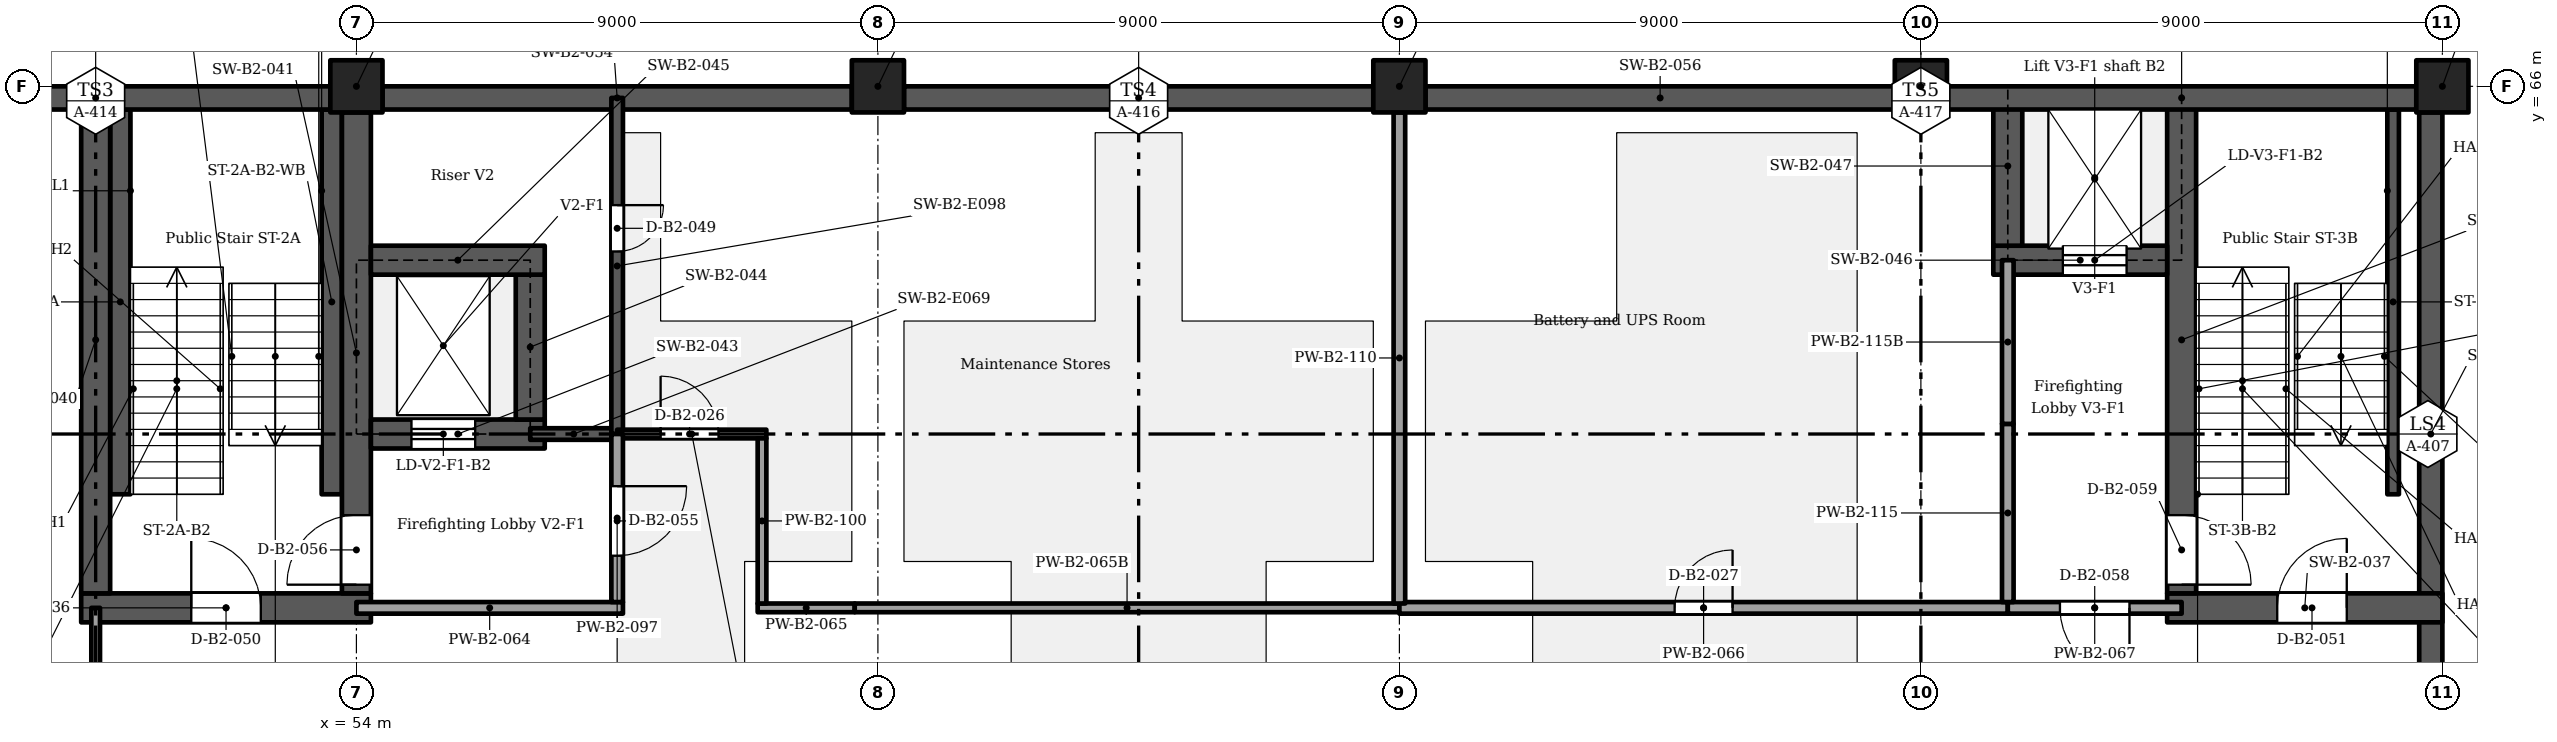
"""IFC4 building model, lengths in metres.
Left out: names, types, materials, properties, quantities, classifications, styles, units other than length and angle.
Written with IfcOpenShell. Run it as: python <this file> out.ifc"""

import sys

from ifc_helpers import new_model, si_unit, direction, frame, frame_2d, origin, origin_2d, place, context, subcontext, project, spatial, rectangle, extrude, element, fill, save


model = new_model("IFC4")
c1 = context("Model", 3, precision=1e-05, world=origin(), true_north=direction((0.0, 1.0)))
c2 = subcontext(c1, "Body", "Model", "MODEL_VIEW")
j1 = project(units=[si_unit("LENGTHUNIT", "METRE"), si_unit("PLANEANGLEUNIT", "RADIAN")], contexts=[c1])
p1 = place(None, origin())
s1 = spatial("IfcSite", under=j1, at=p1, CompositionType="ELEMENT")
p2 = place(p1, origin())
s2 = spatial("IfcBuilding", under=s1, at=p2, CompositionType="ELEMENT")
p3 = place(p2, frame((0.0, 0.0, -8.4)))
s3 = spatial("IfcBuildingStorey", under=s2, at=p3, CompositionType="ELEMENT", Elevation=-8.4)
for number, where, z_axis, x_axis in (
    (1, (54.0, 66.0, 0.0), (0.0, 0.0, 1.0), (1.0, 0.0, 0.0)),
    (2, (63.0, 66.0, 0.0), (0.0, 0.0, 1.0), (1.0, 0.0, 0.0)),
    (3, (72.0, 66.0, 0.0), (0.0, 0.0, 1.0), (1.0, 0.0, 0.0)),
    (4, (81.0, 66.0, 0.0), (0.0, 0.0, 1.0), (1.0, 0.0, 0.0)),
    (5, (90.0, 66.0, 0.0), (0.0, 0.0, 1.0), (1.0, 0.0, 0.0)),
):
    element("IfcColumn", number, at=place(p3, frame(where, z_axis=z_axis, x_axis=x_axis)), inside=s3, PredefinedType="COLUMN", context=c2, shape_type="SweptSolid", body=[
        extrude(rectangle(XDim=0.9, YDim=0.9, at=origin_2d()), origin(), (0.0, 0.0, 1.0), 4.2),
    ])
p4 = place(p3, frame((89.8, 54.45, 0.0), z_axis=(0.0, 0.0, 1.0), x_axis=(0.0, 1.0, 0.0)))
e6 = element("IfcWall", 6, at=p4, inside=s3, PredefinedType="SOLIDWALL", context=c2, shape_type="SweptSolid", body=[
    extrude(rectangle(XDim=11.1, YDim=0.4, at=frame_2d((5.55, 0.0))), origin(), (0.0, 0.0, 1.0), 3.8),
])
p5 = place(p3, frame((49.25, 57.0, 0.0), z_axis=(0.0, 0.0, 1.0), x_axis=(1.0, 0.0, 0.0)))
e7 = element("IfcWall", 7, at=p5, inside=s3, PredefinedType="SHEAR", context=c2, shape_type="SweptSolid", body=[
    extrude(rectangle(XDim=5.0, YDim=0.5, at=frame_2d((2.5, 0.0))), origin(), (0.0, 0.0, 1.0), 3.8),
])
p6 = place(p5, frame((1.9, 0.0, 0.0)))
e8 = element("IfcOpeningElement", 8, at=p6, cuts=e7, PredefinedType="OPENING", context=c2, shape_type="SweptSolid", body=[
    extrude(rectangle(XDim=1.2, YDim=2.1, at=frame_2d((0.6, 1.05))), frame((0.0, 0.26, 0.0), z_axis=(0.0, -1.0, 0.0), x_axis=(1.0, 0.0, 0.0)), (0.0, 0.0, 1.0), 0.52),
])
p7 = place(p3, frame((85.25, 57.0, 0.0), z_axis=(0.0, 0.0, 1.0), x_axis=(1.0, 0.0, 0.0)))
e9 = element("IfcWall", 9, at=p7, inside=s3, PredefinedType="SHEAR", context=c2, shape_type="SweptSolid", body=[
    extrude(rectangle(XDim=4.75, YDim=0.5, at=frame_2d((2.375, 0.0))), origin(), (0.0, 0.0, 1.0), 3.8),
])
p8 = place(p7, frame((1.9, 0.0, 0.0)))
e10 = element("IfcOpeningElement", 10, at=p8, cuts=e9, PredefinedType="OPENING", context=c2, shape_type="SweptSolid", body=[
    extrude(rectangle(XDim=1.2, YDim=2.1, at=frame_2d((0.6, 1.05))), frame((0.0, 0.26, 0.0), z_axis=(0.0, -1.0, 0.0), x_axis=(1.0, 0.0, 0.0)), (0.0, 0.0, 1.0), 0.52),
])
p9 = place(p3, frame((49.5, 57.25, 0.0), z_axis=(0.0, 0.0, 1.0), x_axis=(0.0, 1.0, 0.0)))
e11 = element("IfcWall", 11, at=p9, inside=s3, PredefinedType="SHEAR", context=c2, shape_type="SweptSolid", body=[
    extrude(rectangle(XDim=8.75, YDim=0.5, at=frame_2d((4.375, 0.0))), origin(), (0.0, 0.0, 1.0), 3.8),
])
p10 = place(p3, frame((54.0, 57.25, 0.0), z_axis=(0.0, 0.0, 1.0), x_axis=(0.0, 1.0, 0.0)))
e12 = element("IfcWall", 12, at=p10, inside=s3, PredefinedType="SHEAR", context=c2, shape_type="SweptSolid", body=[
    extrude(rectangle(XDim=8.3, YDim=0.5, at=frame_2d((4.15, 0.0))), origin(), (0.0, 0.0, 1.0), 3.8),
])
p11 = place(p10, frame((0.15, 0.0, 0.0)))
e13 = element("IfcOpeningElement", 13, at=p11, cuts=e12, PredefinedType="OPENING", context=c2, shape_type="SweptSolid", body=[
    extrude(rectangle(XDim=1.2, YDim=2.1, at=frame_2d((0.6, 1.05))), frame((0.0, 0.26, 0.0), z_axis=(0.0, -1.0, 0.0), x_axis=(1.0, 0.0, 0.0)), (0.0, 0.0, 1.0), 0.52),
])
p12 = place(p3, frame((85.5, 57.25, 0.0), z_axis=(0.0, 0.0, 1.0), x_axis=(0.0, 1.0, 0.0)))
e14 = element("IfcWall", 14, at=p12, inside=s3, PredefinedType="SHEAR", context=c2, shape_type="SweptSolid", body=[
    extrude(rectangle(XDim=8.75, YDim=0.5, at=frame_2d((4.375, 0.0))), origin(), (0.0, 0.0, 1.0), 3.8),
])
p13 = place(p12, frame((1.35, 0.0, 0.0), z_axis=(0.0, 0.0, 1.0), x_axis=(-1.0, 0.0, 0.0)))
e15 = element("IfcOpeningElement", 15, at=p13, cuts=e14, PredefinedType="OPENING", context=c2, shape_type="SweptSolid", body=[
    extrude(rectangle(XDim=1.2, YDim=2.1, at=frame_2d((0.6, 1.05))), frame((0.0, 0.26, 0.0), z_axis=(0.0, -1.0, 0.0), x_axis=(1.0, 0.0, 0.0)), (0.0, 0.0, 1.0), 0.52),
])
p14 = place(p3, frame((54.25, 60.0, 0.0), z_axis=(0.0, 0.0, 1.0), x_axis=(1.0, 0.0, 0.0)))
e16 = element("IfcWall", 16, at=p14, inside=s3, PredefinedType="SHEAR", context=c2, shape_type="SweptSolid", body=[
    extrude(rectangle(XDim=3.0, YDim=0.5, at=frame_2d((1.5, 0.0))), origin(), (0.0, 0.0, 1.0), 3.8),
])
p15 = place(p14, frame((0.7, 0.0, 0.0)))
e17 = element("IfcOpeningElement", 17, at=p15, cuts=e16, PredefinedType="OPENING", context=c2, shape_type="SweptSolid", body=[
    extrude(rectangle(XDim=1.1, YDim=2.1, at=frame_2d((0.55, 1.05))), frame((0.0, 0.26, 0.0), z_axis=(0.0, -1.0, 0.0), x_axis=(1.0, 0.0, 0.0)), (0.0, 0.0, 1.0), 0.52),
])
p16 = place(p3, frame((57.0, 60.25, 0.0), z_axis=(0.0, 0.0, 1.0), x_axis=(0.0, 1.0, 0.0)))
e18 = element("IfcWall", 18, at=p16, inside=s3, PredefinedType="SHEAR", context=c2, shape_type="SweptSolid", body=[
    extrude(rectangle(XDim=2.5, YDim=0.5, at=frame_2d((1.25, 0.0))), origin(), (0.0, 0.0, 1.0), 3.8),
])
p17 = place(p3, frame((54.25, 63.0, 0.0), z_axis=(0.0, 0.0, 1.0), x_axis=(1.0, 0.0, 0.0)))
e19 = element("IfcWall", 19, at=p17, inside=s3, PredefinedType="SHEAR", context=c2, shape_type="SweptSolid", body=[
    extrude(rectangle(XDim=3.0, YDim=0.5, at=frame_2d((1.5, 0.0))), origin(), (0.0, 0.0, 1.0), 3.8),
])
p18 = place(p3, frame((82.25, 63.0, 0.0), z_axis=(0.0, 0.0, 1.0), x_axis=(1.0, 0.0, 0.0)))
e20 = element("IfcWall", 20, at=p18, inside=s3, PredefinedType="SHEAR", context=c2, shape_type="SweptSolid", body=[
    extrude(rectangle(XDim=3.0, YDim=0.5, at=frame_2d((1.5, 0.0))), origin(), (0.0, 0.0, 1.0), 3.8),
])
p19 = place(p18, frame((1.2, 0.0, 0.0)))
e21 = element("IfcOpeningElement", 21, at=p19, cuts=e20, PredefinedType="OPENING", context=c2, shape_type="SweptSolid", body=[
    extrude(rectangle(XDim=1.1, YDim=2.1, at=frame_2d((0.55, 1.05))), frame((0.0, 0.26, 0.0), z_axis=(0.0, -1.0, 0.0), x_axis=(1.0, 0.0, 0.0)), (0.0, 0.0, 1.0), 0.52),
])
p20 = place(p3, frame((82.5, 63.25, 0.0), z_axis=(0.0, 0.0, 1.0), x_axis=(0.0, 1.0, 0.0)))
e22 = element("IfcWall", 22, at=p20, inside=s3, PredefinedType="SHEAR", context=c2, shape_type="SweptSolid", body=[
    extrude(rectangle(XDim=2.75, YDim=0.5, at=frame_2d((1.375, 0.0))), origin(), (0.0, 0.0, 1.0), 3.8),
])
for number, where, z_axis, x_axis in (
    (23, (45.45, 65.8, 0.0), (0.0, 0.0, 1.0), (1.0, 0.0, 0.0)),
    (24, (54.45, 65.8, 0.0), (0.0, 0.0, 1.0), (1.0, 0.0, 0.0)),
    (25, (63.45, 65.8, 0.0), (0.0, 0.0, 1.0), (1.0, 0.0, 0.0)),
    (26, (72.45, 65.8, 0.0), (0.0, 0.0, 1.0), (1.0, 0.0, 0.0)),
    (27, (81.45, 65.8, 0.0), (0.0, 0.0, 1.0), (1.0, 0.0, 0.0)),
):
    element("IfcWall", number, at=place(p3, frame(where, z_axis=z_axis, x_axis=x_axis)), inside=s3, PredefinedType="SOLIDWALL", context=c2, shape_type="SweptSolid", body=[
        extrude(rectangle(XDim=8.1, YDim=0.4, at=frame_2d((4.05, 0.0))), origin(), (0.0, 0.0, 1.0), 3.8),
    ])
p21 = place(p3, frame((54.0, 57.0, 0.0), z_axis=(0.0, 0.0, 1.0), x_axis=(1.0, 0.0, 0.0)))
e28 = element("IfcWall", 28, at=p21, inside=s3, PredefinedType="PARTITIONING", context=c2, shape_type="SweptSolid", body=[
    extrude(rectangle(XDim=4.6, YDim=0.2, at=frame_2d((2.3, 0.0))), origin(), (0.0, 0.0, 1.0), 3.1),
])
p22 = place(p3, frame((60.925, 57.0, 0.0), z_axis=(0.0, 0.0, 1.0), x_axis=(1.0, 0.0, 0.0)))
e29 = element("IfcWall", 29, at=p22, inside=s3, PredefinedType="PARTITIONING", context=c2, shape_type="SweptSolid", body=[
    extrude(rectangle(XDim=1.675, YDim=0.15, at=frame_2d((0.837, 0.0))), origin(), (0.0, 0.0, 1.0), 3.1),
])
p23 = place(p3, frame((72.0, 57.0, 0.0), z_axis=(0.0, 0.0, 1.0), x_axis=(1.0, 0.0, 0.0)))
e30 = element("IfcWall", 30, at=p23, inside=s3, PredefinedType="PARTITIONING", context=c2, shape_type="SweptSolid", body=[
    extrude(rectangle(XDim=10.5, YDim=0.2, at=frame_2d((5.25, 0.0))), origin(), (0.0, 0.0, 1.0), 3.8),
])
p24 = place(p23, frame((4.75, 0.0, 0.0)))
e31 = element("IfcOpeningElement", 31, at=p24, cuts=e30, PredefinedType="OPENING", context=c2, shape_type="SweptSolid", body=[
    extrude(rectangle(XDim=1.0, YDim=2.1, at=frame_2d((0.5, 1.05))), frame((0.0, 0.11, 0.0), z_axis=(0.0, -1.0, 0.0), x_axis=(1.0, 0.0, 0.0)), (0.0, 0.0, 1.0), 0.22),
])
p25 = place(p3, frame((82.5, 57.0, 0.0), z_axis=(0.0, 0.0, 1.0), x_axis=(1.0, 0.0, 0.0)))
e32 = element("IfcWall", 32, at=p25, inside=s3, PredefinedType="PARTITIONING", context=c2, shape_type="SweptSolid", body=[
    extrude(rectangle(XDim=3.0, YDim=0.2, at=frame_2d((1.5, 0.0))), origin(), (0.0, 0.0, 1.0), 3.8),
])
p26 = place(p25, frame((2.1, 0.0, 0.0), z_axis=(0.0, 0.0, 1.0), x_axis=(-1.0, 0.0, 0.0)))
e33 = element("IfcOpeningElement", 33, at=p26, cuts=e32, PredefinedType="OPENING", context=c2, shape_type="SweptSolid", body=[
    extrude(rectangle(XDim=1.2, YDim=2.1, at=frame_2d((0.6, 1.05))), frame((0.0, 0.11, 0.0), z_axis=(0.0, -1.0, 0.0), x_axis=(1.0, 0.0, 0.0)), (0.0, 0.0, 1.0), 0.22),
])
p27 = place(p3, frame((57.0, 60.0, 0.0), z_axis=(0.0, 0.0, 1.0), x_axis=(1.0, 0.0, 0.0)))
e34 = element("IfcWall", 34, at=p27, inside=s3, PredefinedType="SHEAR", context=c2, shape_type="SweptSolid", body=[
    extrude(rectangle(XDim=1.5, YDim=0.2, at=frame_2d((0.75, 0.0))), origin(), (0.0, 0.0, 1.0), 3.8),
])
p28 = place(p3, frame((58.5, 60.0, 0.0), z_axis=(0.0, 0.0, 1.0), x_axis=(1.0, 0.0, 0.0)))
e35 = element("IfcWall", 35, at=p28, inside=s3, PredefinedType="PARTITIONING", context=c2, shape_type="SweptSolid", body=[
    extrude(rectangle(XDim=2.575, YDim=0.15, at=frame_2d((1.288, 0.0))), origin(), (0.0, 0.0, 1.0), 3.8),
])
p29 = place(p28, frame((0.75, 0.0, 0.0)))
e36 = element("IfcOpeningElement", 36, at=p29, cuts=e35, PredefinedType="OPENING", context=c2, shape_type="SweptSolid", body=[
    extrude(rectangle(XDim=1.0, YDim=2.1, at=frame_2d((0.5, 1.05))), frame((0.0, 0.085, 0.0), z_axis=(0.0, -1.0, 0.0), x_axis=(1.0, 0.0, 0.0)), (0.0, 0.0, 1.0), 0.17),
])
p30 = place(p3, frame((49.5, 54.075, 0.0), z_axis=(0.0, 0.0, 1.0), x_axis=(0.0, 1.0, 0.0)))
e37 = element("IfcWall", 37, at=p30, inside=s3, PredefinedType="PARTITIONING", context=c2, shape_type="SweptSolid", body=[
    extrude(rectangle(XDim=2.925, YDim=0.15, at=frame_2d((1.462, 0.0))), origin(), (0.0, 0.0, 1.0), 3.3),
])
p31 = place(p3, frame((58.5, 57.1, 0.0), z_axis=(0.0, 0.0, 1.0), x_axis=(0.0, 1.0, 0.0)))
e38 = element("IfcWall", 38, at=p31, inside=s3, PredefinedType="PARTITIONING", context=c2, shape_type="SweptSolid", body=[
    extrude(rectangle(XDim=2.9, YDim=0.2, at=frame_2d((1.45, 0.0))), origin(), (0.0, 0.0, 1.0), 3.8),
])
p32 = place(p31, frame((2.0, 0.0, 0.0), z_axis=(0.0, 0.0, 1.0), x_axis=(-1.0, 0.0, 0.0)))
e39 = element("IfcOpeningElement", 39, at=p32, cuts=e38, PredefinedType="OPENING", context=c2, shape_type="SweptSolid", body=[
    extrude(rectangle(XDim=1.2, YDim=2.1, at=frame_2d((0.6, 1.05))), frame((0.0, 0.11, 0.0), z_axis=(0.0, -1.0, 0.0), x_axis=(1.0, 0.0, 0.0)), (0.0, 0.0, 1.0), 0.22),
])
p33 = place(p3, frame((58.5, 60.0, 0.0), z_axis=(0.0, 0.0, 1.0), x_axis=(0.0, 1.0, 0.0)))
e40 = element("IfcWall", 40, at=p33, inside=s3, PredefinedType="SHEAR", context=c2, shape_type="SweptSolid", body=[
    extrude(rectangle(XDim=5.8, YDim=0.2, at=frame_2d((2.9, 0.0))), origin(), (0.0, 0.0, 1.0), 3.8),
])
p34 = place(p33, frame((3.95, 0.0, 0.0), z_axis=(0.0, 0.0, 1.0), x_axis=(-1.0, 0.0, 0.0)))
e41 = element("IfcOpeningElement", 41, at=p34, cuts=e40, PredefinedType="OPENING", context=c2, shape_type="SweptSolid", body=[
    extrude(rectangle(XDim=0.8, YDim=2.0, at=frame_2d((0.4, 1.0))), frame((0.0, 0.11, 0.0), z_axis=(0.0, -1.0, 0.0), x_axis=(1.0, 0.0, 0.0)), (0.0, 0.0, 1.0), 0.22),
])
p35 = place(p3, frame((61.0, 57.075, 0.0), z_axis=(0.0, 0.0, 1.0), x_axis=(0.0, 1.0, 0.0)))
e42 = element("IfcWall", 42, at=p35, inside=s3, PredefinedType="PARTITIONING", context=c2, shape_type="SweptSolid", body=[
    extrude(rectangle(XDim=2.85, YDim=0.15, at=frame_2d((1.425, 0.0))), origin(), (0.0, 0.0, 1.0), 3.8),
])
p36 = place(p3, frame((72.0, 57.075, 0.0), z_axis=(0.0, 0.0, 1.0), x_axis=(0.0, 1.0, 0.0)))
e43 = element("IfcWall", 43, at=p36, inside=s3, PredefinedType="PARTITIONING", context=c2, shape_type="SweptSolid", body=[
    extrude(rectangle(XDim=8.475, YDim=0.2, at=frame_2d((4.238, 0.0))), origin(), (0.0, 0.0, 1.0), 3.05),
])
p37 = place(p3, frame((82.5, 57.1, 0.0), z_axis=(0.0, 0.0, 1.0), x_axis=(0.0, 1.0, 0.0)))
e44 = element("IfcWall", 44, at=p37, inside=s3, PredefinedType="PARTITIONING", context=c2, shape_type="SweptSolid", body=[
    extrude(rectangle(XDim=3.075, YDim=0.2, at=frame_2d((1.538, 0.0))), origin(), (0.0, 0.0, 1.0), 3.8),
])
for number, where, z_axis, x_axis in (
    (45, (49.925, 58.96, 0.0), (0.0, 0.0, 1.0), (0.0, 1.0, 0.0)),
    (46, (53.575, 58.96, 0.0), (0.0, 0.0, 1.0), (0.0, 1.0, 0.0)),
):
    element("IfcWall", number, at=place(p3, frame(where, z_axis=z_axis, x_axis=x_axis)), inside=s3, PredefinedType="SHEAR", context=c2, shape_type="SweptSolid", body=[
        extrude(rectangle(XDim=6.64, YDim=0.35, at=frame_2d((3.32, 0.0))), origin(), (0.0, 0.0, 1.0), 3.8),
    ])
p38 = place(p3, frame((89.15, 58.96, 0.0), z_axis=(0.0, 0.0, 1.0), x_axis=(0.0, 1.0, 0.0)))
e47 = element("IfcWall", 47, at=p38, inside=s3, PredefinedType="SHEAR", context=c2, shape_type="SweptSolid", body=[
    extrude(rectangle(XDim=6.64, YDim=0.2, at=frame_2d((3.32, 0.0))), origin(), (0.0, 0.0, 1.0), 3.8),
])
p39 = place(p3, frame((62.6, 57.0, 0.0), z_axis=(0.0, 0.0, 1.0), x_axis=(1.0, 0.0, 0.0)))
e48 = element("IfcWall", 48, at=p39, inside=s3, PredefinedType="PARTITIONING", context=c2, shape_type="SweptSolid", body=[
    extrude(rectangle(XDim=9.4, YDim=0.15, at=frame_2d((4.7, 0.0))), origin(), (0.0, 0.0, 1.0), 3.8),
])
p40 = place(p3, frame((82.5, 60.175, 0.0), z_axis=(0.0, 0.0, 1.0), x_axis=(0.0, 1.0, 0.0)))
e49 = element("IfcWall", 49, at=p40, inside=s3, PredefinedType="PARTITIONING", context=c2, shape_type="SweptSolid", body=[
    extrude(rectangle(XDim=2.825, YDim=0.2, at=frame_2d((1.413, 0.0))), origin(), (0.0, 0.0, 1.0), 3.3),
])
p41 = place(p29, origin())
e50 = element("IfcDoor", 50, at=p41, inside=s3, OperationType="SINGLE_SWING_LEFT", PredefinedType="DOOR", context=c2, shape_type="SweptSolid", body=[
    extrude(rectangle(XDim=1.0, YDim=2.1, at=frame_2d((0.5, 1.05))), frame((0.0, 0.025, 0.0), z_axis=(0.0, -1.0, 0.0), x_axis=(1.0, 0.0, 0.0)), (0.0, 0.0, 1.0), 0.05),
])
fill(e36, e50)
p42 = place(p24, origin())
e51 = element("IfcDoor", 51, at=p42, inside=s3, OperationType="SINGLE_SWING_RIGHT", PredefinedType="DOOR", context=c2, shape_type="SweptSolid", body=[
    extrude(rectangle(XDim=1.0, YDim=2.1, at=frame_2d((0.5, 1.05))), frame((0.0, 0.025, 0.0), z_axis=(0.0, -1.0, 0.0), x_axis=(1.0, 0.0, 0.0)), (0.0, 0.0, 1.0), 0.05),
])
fill(e31, e51)
p43 = place(p34, origin())
e52 = element("IfcDoor", 52, at=p43, inside=s3, OperationType="SINGLE_SWING_LEFT", PredefinedType="DOOR", context=c2, shape_type="SweptSolid", body=[
    extrude(rectangle(XDim=0.8, YDim=2.0, at=frame_2d((0.4, 1.0))), frame((0.0, 0.025, 0.0), z_axis=(0.0, -1.0, 0.0), x_axis=(1.0, 0.0, 0.0)), (0.0, 0.0, 1.0), 0.05),
])
fill(e41, e52)
p44 = place(p6, origin())
e53 = element("IfcDoor", 53, at=p44, inside=s3, OperationType="SINGLE_SWING_LEFT", PredefinedType="DOOR", context=c2, shape_type="SweptSolid", body=[
    extrude(rectangle(XDim=1.2, YDim=2.1, at=frame_2d((0.6, 1.05))), frame((0.0, 0.025, 0.0), z_axis=(0.0, -1.0, 0.0), x_axis=(1.0, 0.0, 0.0)), (0.0, 0.0, 1.0), 0.05),
])
fill(e8, e53)
p45 = place(p8, origin())
e54 = element("IfcDoor", 54, at=p45, inside=s3, OperationType="SINGLE_SWING_RIGHT", PredefinedType="DOOR", context=c2, shape_type="SweptSolid", body=[
    extrude(rectangle(XDim=1.2, YDim=2.1, at=frame_2d((0.6, 1.05))), frame((0.0, 0.025, 0.0), z_axis=(0.0, -1.0, 0.0), x_axis=(1.0, 0.0, 0.0)), (0.0, 0.0, 1.0), 0.05),
])
fill(e10, e54)
p46 = place(p32, origin())
e55 = element("IfcDoor", 55, at=p46, inside=s3, OperationType="SINGLE_SWING_LEFT", PredefinedType="DOOR", context=c2, shape_type="SweptSolid", body=[
    extrude(rectangle(XDim=1.2, YDim=2.1, at=frame_2d((0.6, 1.05))), frame((0.0, 0.025, 0.0), z_axis=(0.0, -1.0, 0.0), x_axis=(1.0, 0.0, 0.0)), (0.0, 0.0, 1.0), 0.05),
])
fill(e39, e55)
p47 = place(p11, origin())
e56 = element("IfcDoor", 56, at=p47, inside=s3, OperationType="SINGLE_SWING_LEFT", PredefinedType="DOOR", context=c2, shape_type="SweptSolid", body=[
    extrude(rectangle(XDim=1.2, YDim=2.1, at=frame_2d((0.6, 1.05))), frame((0.0, 0.025, 0.0), z_axis=(0.0, -1.0, 0.0), x_axis=(1.0, 0.0, 0.0)), (0.0, 0.0, 1.0), 0.05),
])
fill(e13, e56)
p48 = place(p15, origin())
e57 = element("IfcDoor", 57, at=p48, inside=s3, OperationType="SLIDING_TO_LEFT", PredefinedType="DOOR", context=c2, shape_type="SweptSolid", body=[
    extrude(rectangle(XDim=1.1, YDim=2.1, at=frame_2d((0.55, 1.05))), frame((0.0, 0.025, 0.0), z_axis=(0.0, -1.0, 0.0), x_axis=(1.0, 0.0, 0.0)), (0.0, 0.0, 1.0), 0.05),
])
fill(e17, e57)
p49 = place(p26, origin())
e58 = element("IfcDoor", 58, at=p49, inside=s3, OperationType="SINGLE_SWING_LEFT", PredefinedType="DOOR", context=c2, shape_type="SweptSolid", body=[
    extrude(rectangle(XDim=1.2, YDim=2.1, at=frame_2d((0.6, 1.05))), frame((0.0, 0.025, 0.0), z_axis=(0.0, -1.0, 0.0), x_axis=(1.0, 0.0, 0.0)), (0.0, 0.0, 1.0), 0.05),
])
fill(e33, e58)
p50 = place(p13, origin())
e59 = element("IfcDoor", 59, at=p50, inside=s3, OperationType="SINGLE_SWING_RIGHT", PredefinedType="DOOR", context=c2, shape_type="SweptSolid", body=[
    extrude(rectangle(XDim=1.2, YDim=2.1, at=frame_2d((0.6, 1.05))), frame((0.0, 0.025, 0.0), z_axis=(0.0, -1.0, 0.0), x_axis=(1.0, 0.0, 0.0)), (0.0, 0.0, 1.0), 0.05),
])
fill(e15, e59)
p51 = place(p19, origin())
e60 = element("IfcDoor", 60, at=p51, inside=s3, OperationType="SLIDING_TO_LEFT", PredefinedType="DOOR", context=c2, shape_type="SweptSolid", body=[
    extrude(rectangle(XDim=1.1, YDim=2.1, at=frame_2d((0.55, 1.05))), frame((0.0, 0.025, 0.0), z_axis=(0.0, -1.0, 0.0), x_axis=(1.0, 0.0, 0.0)), (0.0, 0.0, 1.0), 0.05),
])
fill(e21, e60)
save(model, sys.argv[1])
